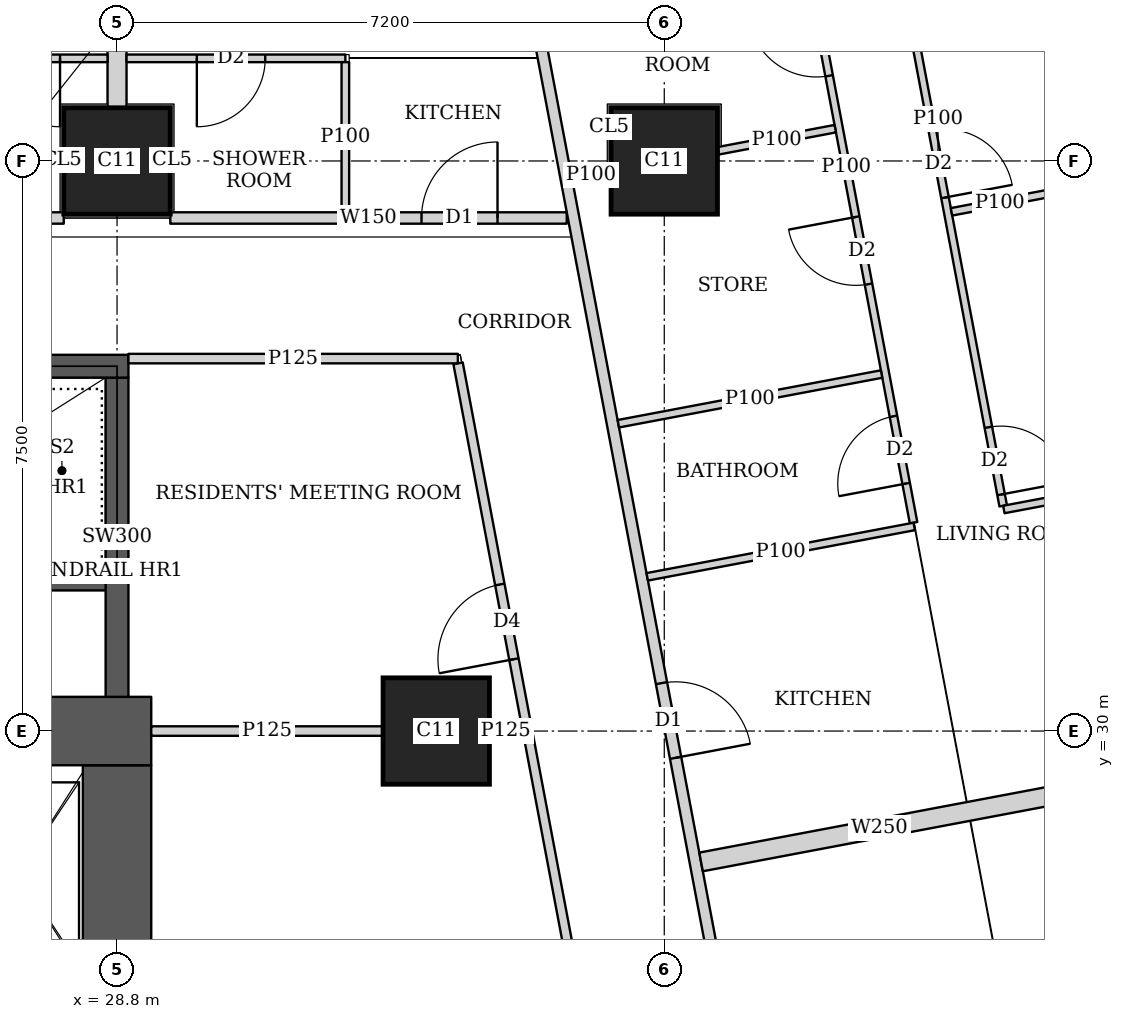
"""IFC4 building model, lengths in metres.
Left out: names, types, materials, properties, quantities, classifications, styles, units other than length and angle.
Written with IfcOpenShell. Run it as: python <this file> out.ifc"""

import sys

from ifc_helpers import new_model, si_unit, direction, frame, frame_2d, origin, origin_2d, place, context, subcontext, project, spatial, rectangle, extrude, element, fill, save


model = new_model("IFC4")
c1 = context("Model", 3, precision=1e-05, world=origin(), true_north=direction((0.0, 1.0)))
c2 = subcontext(c1, "Body", "Model", "MODEL_VIEW")
j1 = project(units=[si_unit("LENGTHUNIT", "METRE"), si_unit("PLANEANGLEUNIT", "RADIAN")], contexts=[c1])
p1 = place(None, origin())
s1 = spatial("IfcSite", under=j1, at=p1, CompositionType="ELEMENT")
p2 = place(p1, origin())
s2 = spatial("IfcBuilding", under=s1, at=p2, CompositionType="ELEMENT")
p3 = place(p2, frame((0.0, 0.0, 277.85)))
s3 = spatial("IfcBuildingStorey", under=s2, at=p3, CompositionType="ELEMENT", Elevation=277.85)
for number, where, z_axis, x_axis in (
    (1, (33.0, 30.0, 0.0), (0.0, 0.0, 1.0), (1.0, 0.0, 0.0)),
    (2, (28.8, 37.5, 0.0), (0.0, 0.0, 1.0), (1.0, 0.0, 0.0)),
    (3, (36.0, 37.5, 0.0), (0.0, 0.0, 1.0), (1.0, 0.0, 0.0)),
):
    element("IfcColumn", number, at=place(p3, frame(where, z_axis=z_axis, x_axis=x_axis)), inside=s3, PredefinedType="COLUMN", context=c2, shape_type="SweptSolid", body=[
        extrude(rectangle(XDim=1.4, YDim=1.4, at=origin_2d()), origin(), (0.0, 0.0, 1.0), 3.75),
    ])
p4 = place(p3, frame((13.95, 30.0, 0.0), z_axis=(0.0, 0.0, 1.0), x_axis=(1.0, 0.0, 0.0)))
e4 = element("IfcWall", 4, at=p4, inside=s3, PredefinedType="SHEAR", context=c2, shape_type="SweptSolid", body=[
    extrude(rectangle(XDim=15.3, YDim=0.9, at=frame_2d((7.65, 0.0))), origin(), (0.0, 0.0, 1.0), 3.75),
])
p5 = place(p4, frame((4.45, 0.0, 0.0)))
e5 = element("IfcOpeningElement", 5, at=p5, cuts=e4, PredefinedType="OPENING", context=c2, shape_type="SweptSolid", body=[
    extrude(rectangle(XDim=1.8, YDim=2.1, at=frame_2d((0.9, 1.05))), frame((0.0, 0.46, 0.0), z_axis=(0.0, -1.0, 0.0), x_axis=(1.0, 0.0, 0.0)), (0.0, 0.0, 1.0), 0.92),
])
p6 = place(p4, frame((10.7, 0.0, 0.0)))
e6 = element("IfcOpeningElement", 6, at=p6, cuts=e4, PredefinedType="OPENING", context=c2, shape_type="SweptSolid", body=[
    extrude(rectangle(XDim=1.1, YDim=2.1, at=frame_2d((0.55, 1.05))), frame((0.0, 0.46, 0.0), z_axis=(0.0, -1.0, 0.0), x_axis=(1.0, 0.0, 0.0)), (0.0, 0.0, 1.0), 0.92),
])
p7 = place(p3, frame((28.8, 15.45, 0.0), z_axis=(0.0, 0.0, 1.0), x_axis=(0.0, 1.0, 0.0)))
e7 = element("IfcWall", 7, at=p7, inside=s3, PredefinedType="SHEAR", context=c2, shape_type="SweptSolid", body=[
    extrude(rectangle(XDim=14.1, YDim=0.9, at=frame_2d((7.05, 0.0))), origin(), (0.0, 0.0, 1.0), 3.75),
])
p8 = place(p3, frame((21.45, 34.8, 0.0), z_axis=(0.0, 0.0, 1.0), x_axis=(1.0, 0.0, 0.0)))
e8 = element("IfcWall", 8, at=p8, inside=s3, PredefinedType="SHEAR", context=c2, shape_type="SweptSolid", body=[
    extrude(rectangle(XDim=7.5, YDim=0.3, at=frame_2d((3.75, 0.0))), origin(), (0.0, 0.0, 1.0), 3.75),
])
p9 = place(p8, frame((0.5, 0.0, 0.0)))
e9 = element("IfcOpeningElement", 9, at=p9, cuts=e8, PredefinedType="OPENING", context=c2, shape_type="SweptSolid", body=[
    extrude(rectangle(XDim=1.1, YDim=2.1, at=frame_2d((0.55, 1.05))), frame((0.0, 0.16, 0.0), z_axis=(0.0, -1.0, 0.0), x_axis=(1.0, 0.0, 0.0)), (0.0, 0.0, 1.0), 0.32),
])
p10 = place(p3, frame((28.8, 30.45, 0.0), z_axis=(0.0, 0.0, 1.0), x_axis=(0.0, 1.0, 0.0)))
e10 = element("IfcWall", 10, at=p10, inside=s3, PredefinedType="SHEAR", context=c2, shape_type="SweptSolid", body=[
    extrude(rectangle(XDim=4.2, YDim=0.3, at=frame_2d((2.1, 0.0))), origin(), (0.0, 0.0, 1.0), 3.75),
])
p11 = place(p3, frame((22.301, 36.75, 0.0), z_axis=(0.0, 0.0, 1.0), x_axis=(1.0, 0.0, 0.0)))
e11 = element("IfcWall", 11, at=p11, inside=s3, PredefinedType="SOLIDWALL", context=c2, shape_type="SweptSolid", body=[
    extrude(rectangle(XDim=5.798, YDim=0.15, at=frame_2d((2.899, 0.0))), origin(), (0.0, 0.0, 1.0), 3.5),
])
p12 = place(p3, frame((29.501, 36.75, 0.0), z_axis=(0.0, 0.0, 1.0), x_axis=(1.0, 0.0, 0.0)))
e12 = element("IfcWall", 12, at=p12, inside=s3, PredefinedType="SOLIDWALL", context=c2, shape_type="SweptSolid", body=[
    extrude(rectangle(XDim=5.216, YDim=0.15, at=frame_2d((2.608, 0.0))), origin(), (0.0, 0.0, 1.0), 3.5),
])
p13 = place(p12, frame((3.305, 0.0, 0.0)))
e13 = element("IfcOpeningElement", 13, at=p13, cuts=e12, PredefinedType="OPENING", context=c2, shape_type="SweptSolid", body=[
    extrude(rectangle(XDim=1.0, YDim=2.1, at=frame_2d((0.5, 1.05))), frame((0.0, 0.085, 0.0), z_axis=(0.0, -1.0, 0.0), x_axis=(1.0, 0.0, 0.0)), (0.0, 0.0, 1.0), 0.17),
])
p14 = place(p3, frame((33.781, 42.186, 0.0), z_axis=(0.0, 0.0, 1.0), x_axis=(0.185593518645, -0.9826266055, 0.0)))
e14 = element("IfcWall", 14, at=p14, inside=s3, PredefinedType="SOLIDWALL", context=c2, shape_type="SweptSolid", body=[
    extrude(rectangle(XDim=35.961, YDim=0.15, at=frame_2d((17.98, 0.0))), origin(), (0.0, 0.0, 1.0), 2.5),
])
p15 = place(p14, frame((11.76, 0.0, 0.0)))
e15 = element("IfcOpeningElement", 15, at=p15, cuts=e14, PredefinedType="OPENING", context=c2, shape_type="SweptSolid", body=[
    extrude(rectangle(XDim=1.0, YDim=2.1, at=frame_2d((0.5, 1.05))), frame((0.0, 0.085, 0.0), z_axis=(0.0, -1.0, 0.0), x_axis=(1.0, 0.0, 0.0)), (0.0, 0.0, 1.0), 0.17),
])
p16 = place(p14, frame((15.576, 0.0, 0.0)))
e16 = element("IfcOpeningElement", 16, at=p16, cuts=e14, PredefinedType="OPENING", context=c2, shape_type="SweptSolid", body=[
    extrude(rectangle(XDim=1.0, YDim=2.1, at=frame_2d((0.5, 1.05))), frame((0.0, 0.085, 0.0), z_axis=(0.0, -1.0, 0.0), x_axis=(1.0, 0.0, 0.0)), (0.0, 0.0, 1.0), 0.17),
])
p17 = place(p14, frame((30.502, 0.0, 0.0)))
e17 = element("IfcOpeningElement", 17, at=p17, cuts=e14, PredefinedType="OPENING", context=c2, shape_type="SweptSolid", body=[
    extrude(rectangle(XDim=1.0, YDim=2.1, at=frame_2d((0.5, 1.05))), frame((0.0, 0.085, 0.0), z_axis=(0.0, -1.0, 0.0), x_axis=(1.0, 0.0, 0.0)), (0.0, 0.0, 1.0), 0.17),
])
p18 = place(p3, frame((38.744, 42.045, 0.0), z_axis=(0.0, 0.0, 1.0), x_axis=(0.185588352162, -0.982627581305, 0.0)))
e18 = element("IfcWall", 18, at=p18, inside=s3, PredefinedType="PARTITIONING", context=c2, shape_type="SweptSolid", body=[
    extrude(rectangle(XDim=9.241, YDim=0.1, at=frame_2d((4.621, 0.0))), origin(), (0.0, 0.0, 1.0), 3.5),
])
p19 = place(p18, frame((8.191, 0.0, 0.0)))
e19 = element("IfcOpeningElement", 19, at=p19, cuts=e18, PredefinedType="OPENING", context=c2, shape_type="SweptSolid", body=[
    extrude(rectangle(XDim=0.9, YDim=2.1, at=frame_2d((0.45, 1.05))), frame((0.0, 0.06, 0.0), z_axis=(0.0, -1.0, 0.0), x_axis=(1.0, 0.0, 0.0)), (0.0, 0.0, 1.0), 0.12),
])
p20 = place(p18, frame((4.215, 0.0, 0.0)))
e20 = element("IfcOpeningElement", 20, at=p20, cuts=e18, PredefinedType="OPENING", context=c2, shape_type="SweptSolid", body=[
    extrude(rectangle(XDim=0.9, YDim=2.1, at=frame_2d((0.45, 1.05))), frame((0.0, 0.06, 0.0), z_axis=(0.0, -1.0, 0.0), x_axis=(1.0, 0.0, 0.0)), (0.0, 0.0, 1.0), 0.12),
])
p21 = place(p3, frame((37.51, 42.109, 0.0), z_axis=(0.0, 0.0, 1.0), x_axis=(0.185659798122, -0.982614084654, 0.0)))
e21 = element("IfcWall", 21, at=p21, inside=s3, PredefinedType="PARTITIONING", context=c2, shape_type="SweptSolid", body=[
    extrude(rectangle(XDim=9.534, YDim=0.1, at=frame_2d((4.767, 0.0))), origin(), (0.0, 0.0, 1.0), 3.5),
])
p22 = place(p21, frame((8.109, 0.0, 0.0)))
e22 = element("IfcOpeningElement", 22, at=p22, cuts=e21, PredefinedType="OPENING", context=c2, shape_type="SweptSolid", body=[
    extrude(rectangle(XDim=0.9, YDim=2.1, at=frame_2d((0.45, 1.05))), frame((0.0, 0.06, 0.0), z_axis=(0.0, -1.0, 0.0), x_axis=(1.0, 0.0, 0.0)), (0.0, 0.0, 1.0), 0.12),
])
p23 = place(p21, frame((2.65, 0.0, 0.0)))
e23 = element("IfcOpeningElement", 23, at=p23, cuts=e21, PredefinedType="OPENING", context=c2, shape_type="SweptSolid", body=[
    extrude(rectangle(XDim=0.9, YDim=2.1, at=frame_2d((0.45, 1.05))), frame((0.0, 0.06, 0.0), z_axis=(0.0, -1.0, 0.0), x_axis=(1.0, 0.0, 0.0)), (0.0, 0.0, 1.0), 0.12),
])
p24 = place(p21, frame((5.44, 0.0, 0.0)))
e24 = element("IfcOpeningElement", 24, at=p24, cuts=e21, PredefinedType="OPENING", context=c2, shape_type="SweptSolid", body=[
    extrude(rectangle(XDim=0.9, YDim=2.1, at=frame_2d((0.45, 1.05))), frame((0.0, 0.06, 0.0), z_axis=(0.0, -1.0, 0.0), x_axis=(1.0, 0.0, 0.0)), (0.0, 0.0, 1.0), 0.12),
])
p25 = place(p3, frame((41.054, 37.072, 0.0), z_axis=(0.0, 0.0, 1.0), x_axis=(-0.982602741717, -0.185719821156, 0.0)))
e25 = element("IfcWall", 25, at=p25, inside=s3, PredefinedType="PARTITIONING", context=c2, shape_type="SweptSolid", body=[
    extrude(rectangle(XDim=1.297, YDim=0.1, at=frame_2d((0.649, 0.0))), origin(), (0.0, 0.0, 1.0), 3.5),
])
p26 = place(p3, frame((44.693, 33.713, 0.0), z_axis=(0.0, 0.0, 1.0), x_axis=(-0.982633535512, -0.185556823879, 0.0)))
e26 = element("IfcWall", 26, at=p26, inside=s3, PredefinedType="PARTITIONING", context=c2, shape_type="SweptSolid", body=[
    extrude(rectangle(XDim=4.3, YDim=0.1, at=frame_2d((2.15, 0.0))), origin(), (0.0, 0.0, 1.0), 2.5),
])
p27 = place(p3, frame((38.25, 37.925, 0.0), z_axis=(0.0, 0.0, 1.0), x_axis=(-0.982610209589, -0.185680305934, 0.0)))
e27 = element("IfcWall", 27, at=p27, inside=s3, PredefinedType="PARTITIONING", context=c2, shape_type="SweptSolid", body=[
    extrude(rectangle(XDim=1.567, YDim=0.1, at=frame_2d((0.784, 0.0))), origin(), (0.0, 0.0, 1.0), 3.5),
])
p28 = place(p3, frame((35.29, 37.366, 0.0), z_axis=(0.0, 0.0, 1.0), x_axis=(-0.982715597703, -0.185121727606, 0.0)))
e28 = element("IfcWall", 28, at=p28, inside=s3, PredefinedType="PARTITIONING", context=c2, shape_type="SweptSolid", body=[
    extrude(rectangle(XDim=0.513, YDim=0.1, at=frame_2d((0.256, 0.0))), origin(), (0.0, 0.0, 1.0), 3.5),
])
p29 = place(p3, frame((39.289, 32.692, 0.0), z_axis=(0.0, 0.0, 1.0), x_axis=(-0.982662827464, -0.185401638399, 0.0)))
e29 = element("IfcWall", 29, at=p29, inside=s3, PredefinedType="PARTITIONING", context=c2, shape_type="SweptSolid", body=[
    extrude(rectangle(XDim=3.575, YDim=0.1, at=frame_2d((1.788, 0.0))), origin(), (0.0, 0.0, 1.0), 3.5),
])
p30 = place(p3, frame((38.859, 34.697, 0.0), z_axis=(0.0, 0.0, 1.0), x_axis=(-0.982626628545, -0.185593396635, 0.0)))
e30 = element("IfcWall", 30, at=p30, inside=s3, PredefinedType="PARTITIONING", context=c2, shape_type="SweptSolid", body=[
    extrude(rectangle(XDim=3.524, YDim=0.1, at=frame_2d((1.762, 0.0))), origin(), (0.0, 0.0, 1.0), 3.5),
])
p31 = place(p3, frame((41.177, 29.164, 0.0), z_axis=(0.0, 0.0, 1.0), x_axis=(-0.982642846239, -0.185507511263, 0.0)))
e31 = element("IfcWall", 31, at=p31, inside=s3, PredefinedType="SOLIDWALL", context=c2, shape_type="SweptSolid", body=[
    extrude(rectangle(XDim=4.776, YDim=0.25, at=frame_2d((2.388, 0.0))), origin(), (0.0, 0.0, 1.0), 2.5),
])
p32 = place(p3, frame((21.6, 38.85, 0.0), z_axis=(0.0, 0.0, 1.0), x_axis=(1.0, 0.0, 0.0)))
e32 = element("IfcWall", 32, at=p32, inside=s3, PredefinedType="PARTITIONING", context=c2, shape_type="SweptSolid", body=[
    extrude(rectangle(XDim=7.075, YDim=0.1, at=frame_2d((3.538, 0.0))), origin(), (0.0, 0.0, 1.0), 3.5),
])
p33 = place(p32, frame((1.35, 0.0, 0.0)))
e33 = element("IfcOpeningElement", 33, at=p33, cuts=e32, PredefinedType="OPENING", context=c2, shape_type="SweptSolid", body=[
    extrude(rectangle(XDim=0.9, YDim=2.1, at=frame_2d((0.45, 1.05))), frame((0.0, 0.06, 0.0), z_axis=(0.0, -1.0, 0.0), x_axis=(1.0, 0.0, 0.0)), (0.0, 0.0, 1.0), 0.12),
])
p34 = place(p32, frame((5.55, 0.0, 0.0)))
e34 = element("IfcOpeningElement", 34, at=p34, cuts=e32, PredefinedType="OPENING", context=c2, shape_type="SweptSolid", body=[
    extrude(rectangle(XDim=0.9, YDim=2.1, at=frame_2d((0.45, 1.05))), frame((0.0, 0.06, 0.0), z_axis=(0.0, -1.0, 0.0), x_axis=(1.0, 0.0, 0.0)), (0.0, 0.0, 1.0), 0.12),
])
p35 = place(p3, frame((28.925, 38.85, 0.0), z_axis=(0.0, 0.0, 1.0), x_axis=(1.0, 0.0, 0.0)))
e35 = element("IfcWall", 35, at=p35, inside=s3, PredefinedType="PARTITIONING", context=c2, shape_type="SweptSolid", body=[
    extrude(rectangle(XDim=2.879, YDim=0.1, at=frame_2d((1.439, 0.0))), origin(), (0.0, 0.0, 1.0), 3.5),
])
p36 = place(p35, frame((0.925, 0.0, 0.0)))
e36 = element("IfcOpeningElement", 36, at=p36, cuts=e35, PredefinedType="OPENING", context=c2, shape_type="SweptSolid", body=[
    extrude(rectangle(XDim=0.9, YDim=2.1, at=frame_2d((0.45, 1.05))), frame((0.0, 0.06, 0.0), z_axis=(0.0, -1.0, 0.0), x_axis=(1.0, 0.0, 0.0)), (0.0, 0.0, 1.0), 0.12),
])
p37 = place(p3, frame((31.804, 36.825, 0.0), z_axis=(0.0, 0.0, 1.0), x_axis=(0.0, 1.0, 0.0)))
e37 = element("IfcWall", 37, at=p37, inside=s3, PredefinedType="PARTITIONING", context=c2, shape_type="SweptSolid", body=[
    extrude(rectangle(XDim=1.975, YDim=0.1, at=frame_2d((0.988, 0.0))), origin(), (0.0, 0.0, 1.0), 3.5),
])
p38 = place(p3, frame((28.8, 38.201, 0.0), z_axis=(0.0, 0.0, 1.0), x_axis=(0.0, 1.0, 0.0)))
e38 = element("IfcWall", 38, at=p38, inside=s3, PredefinedType="SOLIDWALL", context=c2, shape_type="SweptSolid", body=[
    extrude(rectangle(XDim=1.849, YDim=0.25, at=frame_2d((0.925, 0.0))), origin(), (0.0, 0.0, 1.0), 3.5),
])
p39 = place(p3, frame((28.95, 34.9, 0.0), z_axis=(0.0, 0.0, 1.0), x_axis=(1.0, 0.0, 0.0)))
e39 = element("IfcWall", 39, at=p39, inside=s3, PredefinedType="PARTITIONING", context=c2, shape_type="SweptSolid", body=[
    extrude(rectangle(XDim=4.334, YDim=0.125, at=frame_2d((2.167, 0.0))), origin(), (0.0, 0.0, 1.0), 3.5),
])
p40 = place(p3, frame((37.947, 10.163, 0.0), z_axis=(0.0, 0.0, 1.0), x_axis=(-0.185572770922, 0.982630523998, 0.0)))
e40 = element("IfcWall", 40, at=p40, inside=s3, PredefinedType="PARTITIONING", context=c2, shape_type="SweptSolid", body=[
    extrude(rectangle(XDim=25.111, YDim=0.125, at=frame_2d((12.556, 0.0))), origin(), (0.0, 0.0, 1.0), 2.5),
])
p41 = place(p40, frame((0.708, 0.0, 0.0)))
e41 = element("IfcOpeningElement", 41, at=p41, cuts=e40, PredefinedType="OPENING", context=c2, shape_type="SweptSolid", body=[
    extrude(rectangle(XDim=1.0, YDim=2.1, at=frame_2d((0.5, 1.05))), frame((0.0, 0.073, 0.0), z_axis=(0.0, -1.0, 0.0), x_axis=(1.0, 0.0, 0.0)), (0.0, 0.0, 1.0), 0.145),
])
p42 = place(p40, frame((5.9, 0.0, 0.0)))
e42 = element("IfcOpeningElement", 42, at=p42, cuts=e40, PredefinedType="OPENING", context=c2, shape_type="SweptSolid", body=[
    extrude(rectangle(XDim=1.0, YDim=2.1, at=frame_2d((0.5, 1.05))), frame((0.0, 0.073, 0.0), z_axis=(0.0, -1.0, 0.0), x_axis=(1.0, 0.0, 0.0)), (0.0, 0.0, 1.0), 0.145),
])
p43 = place(p40, frame((13.378, 0.0, 0.0)))
e43 = element("IfcOpeningElement", 43, at=p43, cuts=e40, PredefinedType="OPENING", context=c2, shape_type="SweptSolid", body=[
    extrude(rectangle(XDim=1.0, YDim=2.1, at=frame_2d((0.5, 1.05))), frame((0.0, 0.073, 0.0), z_axis=(0.0, -1.0, 0.0), x_axis=(1.0, 0.0, 0.0)), (0.0, 0.0, 1.0), 0.145),
])
p44 = place(p40, frame((21.15, 0.0, 0.0)))
e44 = element("IfcOpeningElement", 44, at=p44, cuts=e40, PredefinedType="OPENING", context=c2, shape_type="SweptSolid", body=[
    extrude(rectangle(XDim=1.0, YDim=2.1, at=frame_2d((0.5, 1.05))), frame((0.0, 0.073, 0.0), z_axis=(0.0, -1.0, 0.0), x_axis=(1.0, 0.0, 0.0)), (0.0, 0.0, 1.0), 0.145),
])
p45 = place(p3, frame((29.25, 30.0, 0.0), z_axis=(0.0, 0.0, 1.0), x_axis=(1.0, 0.0, 0.0)))
e45 = element("IfcWall", 45, at=p45, inside=s3, PredefinedType="PARTITIONING", context=c2, shape_type="SweptSolid", body=[
    extrude(rectangle(XDim=3.049, YDim=0.125, at=frame_2d((1.524, 0.0))), origin(), (0.0, 0.0, 1.0), 3.5),
])
p46 = place(p3, frame((33.701, 30.0, 0.0), z_axis=(0.0, 0.0, 1.0), x_axis=(1.0, 0.0, 0.0)))
e46 = element("IfcWall", 46, at=p46, inside=s3, PredefinedType="PARTITIONING", context=c2, shape_type="SweptSolid", body=[
    extrude(rectangle(XDim=0.424, YDim=0.125, at=frame_2d((0.212, 0.0))), origin(), (0.0, 0.0, 1.0), 2.5),
])
p47 = place(p3, frame((23.0, 31.95, 0.0), z_axis=(0.0, 0.0, 1.0), x_axis=(1.0, 0.0, 0.0)))
e47 = element("IfcWall", 47, at=p47, inside=s3, PredefinedType="SHEAR", context=c2, shape_type="SweptSolid", body=[
    extrude(rectangle(XDim=5.8, YDim=0.2, at=frame_2d((2.9, 0.0))), origin(), (0.0, 0.0, 1.0), 3.75),
])
p48 = place(p19, origin())
e48 = element("IfcDoor", 48, at=p48, inside=s3, OperationType="SINGLE_SWING_RIGHT", PredefinedType="DOOR", context=c2, shape_type="SweptSolid", body=[
    extrude(rectangle(XDim=0.9, YDim=2.1, at=frame_2d((0.45, 1.05))), frame((0.0, 0.025, 0.0), z_axis=(0.0, -1.0, 0.0), x_axis=(1.0, 0.0, 0.0)), (0.0, 0.0, 1.0), 0.05),
])
fill(e19, e48)
p49 = place(p20, origin())
e49 = element("IfcDoor", 49, at=p49, inside=s3, OperationType="SINGLE_SWING_RIGHT", PredefinedType="DOOR", context=c2, shape_type="SweptSolid", body=[
    extrude(rectangle(XDim=0.9, YDim=2.1, at=frame_2d((0.45, 1.05))), frame((0.0, 0.025, 0.0), z_axis=(0.0, -1.0, 0.0), x_axis=(1.0, 0.0, 0.0)), (0.0, 0.0, 1.0), 0.05),
])
fill(e20, e49)
p50 = place(p22, origin())
e50 = element("IfcDoor", 50, at=p50, inside=s3, OperationType="SINGLE_SWING_LEFT", PredefinedType="DOOR", context=c2, shape_type="SweptSolid", body=[
    extrude(rectangle(XDim=0.9, YDim=2.1, at=frame_2d((0.45, 1.05))), frame((0.0, 0.025, 0.0), z_axis=(0.0, -1.0, 0.0), x_axis=(1.0, 0.0, 0.0)), (0.0, 0.0, 1.0), 0.05),
])
fill(e22, e50)
p51 = place(p23, origin())
e51 = element("IfcDoor", 51, at=p51, inside=s3, OperationType="SINGLE_SWING_RIGHT", PredefinedType="DOOR", context=c2, shape_type="SweptSolid", body=[
    extrude(rectangle(XDim=0.9, YDim=2.1, at=frame_2d((0.45, 1.05))), frame((0.0, 0.025, 0.0), z_axis=(0.0, -1.0, 0.0), x_axis=(1.0, 0.0, 0.0)), (0.0, 0.0, 1.0), 0.05),
])
fill(e23, e51)
p52 = place(p24, origin())
e52 = element("IfcDoor", 52, at=p52, inside=s3, OperationType="SINGLE_SWING_RIGHT", PredefinedType="DOOR", context=c2, shape_type="SweptSolid", body=[
    extrude(rectangle(XDim=0.9, YDim=2.1, at=frame_2d((0.45, 1.05))), frame((0.0, 0.025, 0.0), z_axis=(0.0, -1.0, 0.0), x_axis=(1.0, 0.0, 0.0)), (0.0, 0.0, 1.0), 0.05),
])
fill(e24, e52)
p53 = place(p15, origin())
e53 = element("IfcDoor", 53, at=p53, inside=s3, OperationType="SINGLE_SWING_RIGHT", PredefinedType="DOOR", context=c2, shape_type="SweptSolid", body=[
    extrude(rectangle(XDim=1.0, YDim=2.1, at=frame_2d((0.5, 1.05))), frame((0.0, 0.025, 0.0), z_axis=(0.0, -1.0, 0.0), x_axis=(1.0, 0.0, 0.0)), (0.0, 0.0, 1.0), 0.05),
])
fill(e15, e53)
p54 = place(p34, origin())
e54 = element("IfcDoor", 54, at=p54, inside=s3, OperationType="SINGLE_SWING_LEFT", PredefinedType="DOOR", context=c2, shape_type="SweptSolid", body=[
    extrude(rectangle(XDim=0.9, YDim=2.1, at=frame_2d((0.45, 1.05))), frame((0.0, 0.025, 0.0), z_axis=(0.0, -1.0, 0.0), x_axis=(1.0, 0.0, 0.0)), (0.0, 0.0, 1.0), 0.05),
])
fill(e34, e54)
p55 = place(p36, origin())
e55 = element("IfcDoor", 55, at=p55, inside=s3, OperationType="SINGLE_SWING_RIGHT", PredefinedType="DOOR", context=c2, shape_type="SweptSolid", body=[
    extrude(rectangle(XDim=0.9, YDim=2.1, at=frame_2d((0.45, 1.05))), frame((0.0, 0.025, 0.0), z_axis=(0.0, -1.0, 0.0), x_axis=(1.0, 0.0, 0.0)), (0.0, 0.0, 1.0), 0.05),
])
fill(e36, e55)
p56 = place(p13, origin())
e56 = element("IfcDoor", 56, at=p56, inside=s3, OperationType="SINGLE_SWING_RIGHT", PredefinedType="DOOR", context=c2, shape_type="SweptSolid", body=[
    extrude(rectangle(XDim=1.0, YDim=2.1, at=frame_2d((0.5, 1.05))), frame((0.0, 0.025, 0.0), z_axis=(0.0, -1.0, 0.0), x_axis=(1.0, 0.0, 0.0)), (0.0, 0.0, 1.0), 0.05),
])
fill(e13, e56)
p57 = place(p44, origin())
e57 = element("IfcDoor", 57, at=p57, inside=s3, OperationType="SINGLE_SWING_LEFT", PredefinedType="DOOR", context=c2, shape_type="SweptSolid", body=[
    extrude(rectangle(XDim=1.0, YDim=2.1, at=frame_2d((0.5, 1.05))), frame((0.0, 0.025, 0.0), z_axis=(0.0, -1.0, 0.0), x_axis=(1.0, 0.0, 0.0)), (0.0, 0.0, 1.0), 0.05),
])
fill(e44, e57)
save(model, sys.argv[1])
